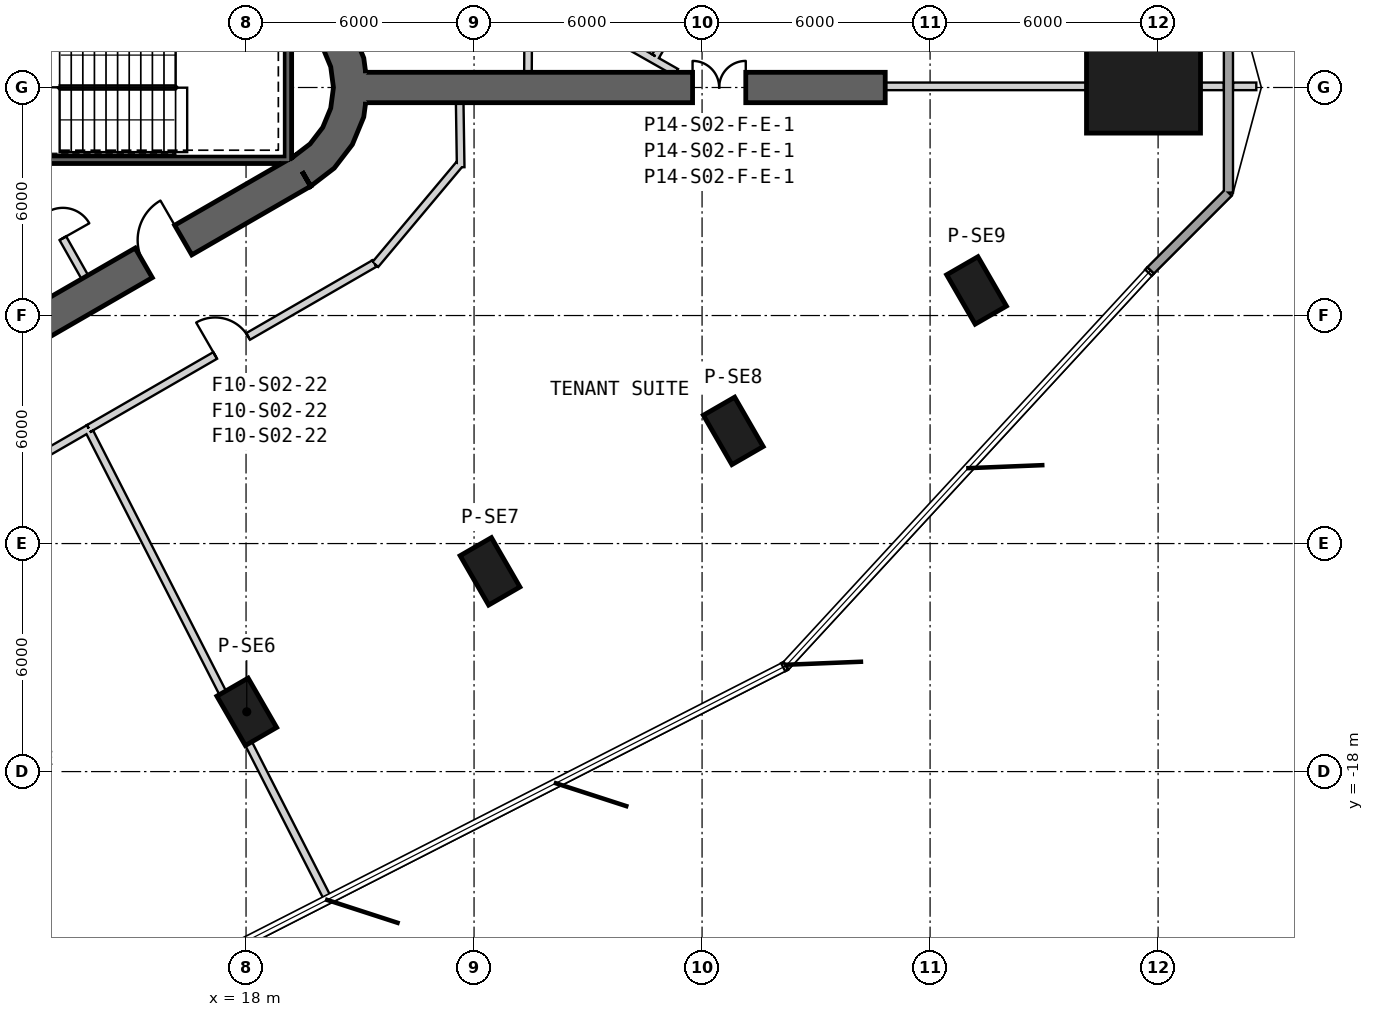
"""IFC4 building model, lengths in metres.
Left out: names, types, materials, properties, quantities, classifications, styles, units other than length and angle.
Written with IfcOpenShell. Run it as: python <this file> out.ifc"""

import sys

from ifc_helpers import new_model, si_unit, direction, frame, frame_2d, origin, origin_2d, place, context, subcontext, project, spatial, polyline, rectangle, outline, extrude, element, fill, save


model = new_model("IFC4")
c1 = context("Model", 3, precision=1e-05, world=origin(), true_north=direction((0.0, 1.0)))
c2 = subcontext(c1, "Body", "Model", "MODEL_VIEW")
j1 = project(units=[si_unit("LENGTHUNIT", "METRE"), si_unit("PLANEANGLEUNIT", "RADIAN")], contexts=[c1])
p1 = place(None, origin())
s1 = spatial("IfcSite", under=j1, at=p1, CompositionType="ELEMENT")
p2 = place(p1, origin())
s2 = spatial("IfcBuilding", under=s1, at=p2, CompositionType="ELEMENT")
p3 = place(p2, frame((0.0, 0.0, 70.1)))
s3 = spatial("IfcBuildingStorey", under=s2, at=p3, CompositionType="ELEMENT", Elevation=70.1)
p4 = place(p3, frame((41.616, 0.0, 0.0), z_axis=(0.0, 0.0, 1.0), x_axis=(1.0, 0.0, 0.0)))
e1 = element("IfcColumn", 1, at=p4, inside=s3, PredefinedType="COLUMN", context=c2, shape_type="SweptSolid", body=[
    extrude(rectangle(XDim=3.0, YDim=2.4, at=origin_2d()), origin(), (0.0, 0.0, 1.0), 4.1),
])
for number, where, z_axis, x_axis in (
    (2, (18.019, -16.427, 0.0), (0.0, 0.0, 1.0), (0.5, -0.866, 0.0)),
    (3, (24.42, -12.731, 0.0), (0.0, 0.0, 1.0), (0.5, -0.866, 0.0)),
    (4, (30.821, -9.035, 0.0), (0.0, 0.0, 1.0), (0.5, -0.866, 0.0)),
    (5, (37.223, -5.34, 0.0), (0.0, 0.0, 1.0), (0.5, -0.866, 0.0)),
):
    element("IfcColumn", number, at=place(p3, frame(where, z_axis=z_axis, x_axis=x_axis)), inside=s3, PredefinedType="COLUMN", context=c2, shape_type="SweptSolid", body=[
        extrude(rectangle(XDim=1.5, YDim=0.95, at=origin_2d()), origin(), (0.0, 0.0, 1.0), 4.1),
    ])
p5 = place(p3, frame((-7.825, -17.97, 0.0), z_axis=(0.0, 0.0, 1.0), x_axis=(0.866028369851, 0.499994862586, 0.0)))
e6 = element("IfcWall", 6, at=p5, inside=s3, PredefinedType="SHEAR", context=c2, shape_type="SweptSolid", body=[
    extrude(rectangle(XDim=31.523, YDim=0.9, at=frame_2d((15.762, 0.0))), origin(), (0.0, 0.0, 1.0), 4.1),
])
p6 = place(p5, frame((7.062, 0.0, 0.0)))
e7 = element("IfcOpeningElement", 7, at=p6, cuts=e6, PredefinedType="OPENING", context=c2, shape_type="SweptSolid", body=[
    extrude(rectangle(XDim=1.2, YDim=2.4, at=frame_2d((0.6, 1.2))), frame((0.0, 0.46, 0.0), z_axis=(0.0, -1.0, 0.0), x_axis=(1.0, 0.0, 0.0)), (0.0, 0.0, 1.0), 0.92),
])
p7 = place(p5, frame((9.762, 0.0, 0.0)))
e8 = element("IfcOpeningElement", 8, at=p7, cuts=e6, PredefinedType="OPENING", context=c2, shape_type="SweptSolid", body=[
    extrude(rectangle(XDim=1.2, YDim=2.4, at=frame_2d((0.6, 1.2))), frame((0.0, 0.46, 0.0), z_axis=(0.0, -1.0, 0.0), x_axis=(1.0, 0.0, 0.0)), (0.0, 0.0, 1.0), 0.92),
])
p8 = place(p5, frame((12.462, 0.0, 0.0)))
e9 = element("IfcOpeningElement", 9, at=p8, cuts=e6, PredefinedType="OPENING", context=c2, shape_type="SweptSolid", body=[
    extrude(rectangle(XDim=1.2, YDim=2.4, at=frame_2d((0.6, 1.2))), frame((0.0, 0.46, 0.0), z_axis=(0.0, -1.0, 0.0), x_axis=(1.0, 0.0, 0.0)), (0.0, 0.0, 1.0), 0.92),
])
p9 = place(p5, frame((15.162, 0.0, 0.0)))
e10 = element("IfcOpeningElement", 10, at=p9, cuts=e6, PredefinedType="OPENING", context=c2, shape_type="SweptSolid", body=[
    extrude(rectangle(XDim=1.2, YDim=2.4, at=frame_2d((0.6, 1.2))), frame((0.0, 0.46, 0.0), z_axis=(0.0, -1.0, 0.0), x_axis=(1.0, 0.0, 0.0)), (0.0, 0.0, 1.0), 0.92),
])
p10 = place(p5, frame((17.862, 0.0, 0.0)))
e11 = element("IfcOpeningElement", 11, at=p10, cuts=e6, PredefinedType="OPENING", context=c2, shape_type="SweptSolid", body=[
    extrude(rectangle(XDim=1.2, YDim=2.4, at=frame_2d((0.6, 1.2))), frame((0.0, 0.46, 0.0), z_axis=(0.0, -1.0, 0.0), x_axis=(1.0, 0.0, 0.0)), (0.0, 0.0, 1.0), 0.92),
])
p11 = place(p5, frame((20.562, 0.0, 0.0)))
e12 = element("IfcOpeningElement", 12, at=p11, cuts=e6, PredefinedType="OPENING", context=c2, shape_type="SweptSolid", body=[
    extrude(rectangle(XDim=1.2, YDim=2.4, at=frame_2d((0.6, 1.2))), frame((0.0, 0.46, 0.0), z_axis=(0.0, -1.0, 0.0), x_axis=(1.0, 0.0, 0.0)), (0.0, 0.0, 1.0), 0.92),
])
p12 = place(p5, frame((26.712, 0.0, 0.0)))
e13 = element("IfcOpeningElement", 13, at=p12, cuts=e6, PredefinedType="OPENING", context=c2, shape_type="SweptSolid", body=[
    extrude(rectangle(XDim=1.2, YDim=2.4, at=frame_2d((0.6, 1.2))), frame((0.0, 0.46, 0.0), z_axis=(0.0, -1.0, 0.0), x_axis=(1.0, 0.0, 0.0)), (0.0, 0.0, 1.0), 0.92),
])
p13 = place(p5, frame((3.612, 0.0, 0.0)))
e14 = element("IfcOpeningElement", 14, at=p13, cuts=e6, PredefinedType="OPENING", context=c2, shape_type="SweptSolid", body=[
    extrude(rectangle(XDim=1.2, YDim=2.4, at=frame_2d((0.6, 1.2))), frame((0.0, 0.46, 0.0), z_axis=(0.0, -1.0, 0.0), x_axis=(1.0, 0.0, 0.0)), (0.0, 0.0, 1.0), 0.92),
])
p14 = place(p3, origin())
e15 = element("IfcWall", 15, at=p14, inside=s3, PredefinedType="SHEAR", context=c2, shape_type="SweptSolid", body=[
    extrude(outline(polyline([(19.7, -2.598), (20.321, -2.121), (20.798, -1.5), (21.098, -0.777), (21.2, 0.0), (21.098, 0.777), (20.798, 1.5), (20.321, 2.121), (19.7, 2.598), (19.25, 1.819), (19.685, 1.485), (20.019, 1.05), (20.229, 0.543), (20.3, 0.0), (20.229, -0.543), (20.019, -1.05), (19.685, -1.485), (19.25, -1.819), (19.7, -2.598)])), origin(), (0.0, 0.0, 1.0), 4.1),
])
p15 = place(p3, frame((21.15, 0.0, 0.0), z_axis=(0.0, 0.0, 1.0), x_axis=(1.0, 0.0, 0.0)))
e16 = element("IfcWall", 16, at=p15, inside=s3, PredefinedType="SHEAR", context=c2, shape_type="SweptSolid", body=[
    extrude(rectangle(XDim=13.67, YDim=0.8, at=frame_2d((6.835, 0.0))), origin(), (0.0, 0.0, 1.0), 4.1),
])
p16 = place(p15, frame((8.6, 0.0, 0.0)))
e17 = element("IfcOpeningElement", 17, at=p16, cuts=e16, PredefinedType="OPENING", context=c2, shape_type="SweptSolid", body=[
    extrude(rectangle(XDim=1.4, YDim=2.4, at=frame_2d((0.7, 1.2))), frame((0.0, 0.41, 0.0), z_axis=(0.0, -1.0, 0.0), x_axis=(1.0, 0.0, 0.0)), (0.0, 0.0, 1.0), 0.82),
])
p17 = place(p3, frame((41.802, -4.814, 0.0), z_axis=(0.0, 0.0, 1.0), x_axis=(0.707148907235, 0.707064652629, 0.0)))
e18 = element("IfcWall", 18, at=p17, inside=s3, PredefinedType="SOLIDWALL", context=c2, shape_type="SweptSolid", body=[
    extrude(rectangle(XDim=2.898, YDim=0.24, at=frame_2d((1.449, 0.0))), origin(), (0.0, 0.0, 1.0), 3.8),
])
p18 = place(p3, frame((43.851, -2.766, 0.0), z_axis=(0.0, 0.0, 1.0), x_axis=(0.0, 1.0, 0.0)))
e19 = element("IfcWall", 19, at=p18, inside=s3, PredefinedType="SOLIDWALL", context=c2, shape_type="SweptSolid", body=[
    extrude(rectangle(XDim=5.531, YDim=0.24, at=frame_2d((2.766, 0.0))), origin(), (0.0, 0.0, 1.0), 3.8),
])
p19 = place(p3, frame((19.1, -2.0, -0.3), z_axis=(0.0, 0.0, 1.0), x_axis=(0.0, 1.0, 0.0)))
e20 = element("IfcWall", 20, at=p19, inside=s3, PredefinedType="SHEAR", context=c2, shape_type="SweptSolid", body=[
    extrude(rectangle(XDim=3.8, YDim=0.2, at=frame_2d((1.9, 0.0))), origin(), (0.0, 0.0, 1.0), 4.1),
])
p20 = place(p3, frame((11.1, -1.9, -0.3), z_axis=(0.0, 0.0, 1.0), x_axis=(1.0, 0.0, 0.0)))
e21 = element("IfcWall", 21, at=p20, inside=s3, PredefinedType="SHEAR", context=c2, shape_type="SweptSolid", body=[
    extrude(rectangle(XDim=7.9, YDim=0.2, at=frame_2d((3.95, 0.0))), origin(), (0.0, 0.0, 1.0), 4.1),
])
p21 = place(p3, frame((13.758, -4.99, 0.0), z_axis=(0.0, 0.0, 1.0), x_axis=(-0.491993409184, 0.87059892334, 0.0)))
e22 = element("IfcWall", 22, at=p21, inside=s3, PredefinedType="PARTITIONING", context=c2, shape_type="SweptSolid", body=[
    extrude(rectangle(XDim=3.15, YDim=0.2, at=frame_2d((1.575, 0.0))), origin(), (0.0, 0.0, 1.0), 3.8),
])
p22 = place(p21, frame((1.175, 0.0, 0.0)))
e23 = element("IfcOpeningElement", 23, at=p22, cuts=e22, PredefinedType="OPENING", context=c2, shape_type="SweptSolid", body=[
    extrude(rectangle(XDim=0.8, YDim=2.1, at=frame_2d((0.4, 1.05))), frame((0.0, 0.11, 0.0), z_axis=(0.0, -1.0, 0.0), x_axis=(1.0, 0.0, 0.0)), (0.0, 0.0, 1.0), 0.22),
])
p23 = place(p3, frame((25.418, 0.4, 0.0), z_axis=(0.0, 0.0, 1.0), x_axis=(0.005737699208, 0.999983539268, 0.0)))
e24 = element("IfcWall", 24, at=p23, inside=s3, PredefinedType="PARTITIONING", context=c2, shape_type="SweptSolid", body=[
    extrude(rectangle(XDim=2.255, YDim=0.2, at=frame_2d((1.127, 0.0))), origin(), (0.0, 0.0, 1.0), 3.8),
])
p24 = place(p3, frame((23.648, -2.098, 0.0), z_axis=(0.0, 0.0, 1.0), x_axis=(-0.015095332307, 0.99988605898, 0.0)))
e25 = element("IfcWall", 25, at=p24, inside=s3, PredefinedType="PARTITIONING", context=c2, shape_type="SweptSolid", body=[
    extrude(rectangle(XDim=1.698, YDim=0.2, at=frame_2d((0.849, 0.0))), origin(), (0.0, 0.0, 1.0), 3.8),
])
p25 = place(p3, frame((21.401, -4.657, 0.0), z_axis=(0.0, 0.0, 1.0), x_axis=(0.642796210095, 0.766037226437, 0.0)))
e26 = element("IfcWall", 26, at=p25, inside=s3, PredefinedType="PARTITIONING", context=c2, shape_type="SweptSolid", body=[
    extrude(rectangle(XDim=3.443, YDim=0.2, at=frame_2d((1.721, 0.0))), origin(), (0.0, 0.0, 1.0), 2.88),
])
p26 = place(p3, frame((2.144, -15.737, 0.0), z_axis=(0.0, 0.0, 1.0), x_axis=(0.866019431537, 0.500010344094, 0.0)))
e27 = element("IfcWall", 27, at=p26, inside=s3, PredefinedType="PARTITIONING", context=c2, shape_type="SweptSolid", body=[
    extrude(rectangle(XDim=13.531, YDim=0.2, at=frame_2d((6.766, 0.0))), origin(), (0.0, 0.0, 1.0), 3.08),
])
p27 = place(p26, frame((6.254, 0.0, 0.0)))
e28 = element("IfcOpeningElement", 28, at=p27, cuts=e27, PredefinedType="OPENING", context=c2, shape_type="SweptSolid", body=[
    extrude(rectangle(XDim=1.0, YDim=2.1, at=frame_2d((0.5, 1.05))), frame((0.0, 0.11, 0.0), z_axis=(0.0, -1.0, 0.0), x_axis=(1.0, 0.0, 0.0)), (0.0, 0.0, 1.0), 0.22),
])
p28 = place(p3, frame((13.862, -8.971, 0.0), z_axis=(0.0, 0.0, 1.0), x_axis=(0.866032891431, 0.499987030792, 0.0)))
e29 = element("IfcWall", 29, at=p28, inside=s3, PredefinedType="PARTITIONING", context=c2, shape_type="SweptSolid", body=[
    extrude(rectangle(XDim=8.68, YDim=0.2, at=frame_2d((4.34, 0.0))), origin(), (0.0, 0.0, 1.0), 2.98),
])
p29 = place(p28, frame((3.84, 0.0, 0.0)))
e30 = element("IfcOpeningElement", 30, at=p29, cuts=e29, PredefinedType="OPENING", context=c2, shape_type="SweptSolid", body=[
    extrude(rectangle(XDim=1.0, YDim=2.1, at=frame_2d((0.5, 1.05))), frame((0.0, 0.11, 0.0), z_axis=(0.0, -1.0, 0.0), x_axis=(1.0, 0.0, 0.0)), (0.0, 0.0, 1.0), 0.22),
])
p30 = place(p3, frame((34.82, 0.03, 0.0), z_axis=(0.0, 0.0, 1.0), x_axis=(1.0, 0.0, 0.0)))
e31 = element("IfcWall", 31, at=p30, inside=s3, PredefinedType="PARTITIONING", context=c2, shape_type="SweptSolid", body=[
    extrude(rectangle(XDim=5.296, YDim=0.2, at=frame_2d((2.648, 0.0))), origin(), (0.0, 0.0, 1.0), 3.37),
])
p31 = place(p3, frame((43.116, 0.03, 0.0), z_axis=(0.0, 0.0, 1.0), x_axis=(1.0, 0.0, 0.0)))
e32 = element("IfcWall", 32, at=p31, inside=s3, PredefinedType="PARTITIONING", context=c2, shape_type="SweptSolid", body=[
    extrude(rectangle(XDim=0.615, YDim=0.2, at=frame_2d((0.307, 0.0))), origin(), (0.0, 0.0, 1.0), 3.8),
])
p32 = place(p3, frame((43.971, 0.03, 0.0), z_axis=(0.0, 0.0, 1.0), x_axis=(1.0, 0.0, 0.0)))
e33 = element("IfcWall", 33, at=p32, inside=s3, PredefinedType="PARTITIONING", context=c2, shape_type="SweptSolid", body=[
    extrude(rectangle(XDim=0.613, YDim=0.2, at=frame_2d((0.307, 0.0))), origin(), (0.0, 0.0, 1.0), 3.8),
])
p33 = place(p3, frame((25.446, 2.594, 0.0), z_axis=(0.0, 0.0, 1.0), x_axis=(0.869969631216, -0.493105303928, 0.0)))
e34 = element("IfcWall", 34, at=p33, inside=s3, PredefinedType="PARTITIONING", context=c2, shape_type="SweptSolid", body=[
    extrude(rectangle(XDim=4.45, YDim=0.2, at=frame_2d((2.225, 0.0))), origin(), (0.0, 0.0, 1.0), 3.8),
])
p34 = place(p3, frame((28.776, 0.822, 0.0), z_axis=(0.0, 0.0, 1.0), x_axis=(0.499995686755, 0.866027894023, 0.0)))
e35 = element("IfcWall", 35, at=p34, inside=s3, PredefinedType="PARTITIONING", context=c2, shape_type="SweptSolid", body=[
    extrude(rectangle(XDim=5.44, YDim=0.2, at=frame_2d((2.72, 0.0))), origin(), (0.0, 0.0, 1.0), 2.88),
])
p35 = place(p34, frame((2.17, 0.0, 0.0)))
e36 = element("IfcOpeningElement", 36, at=p35, cuts=e35, PredefinedType="OPENING", context=c2, shape_type="SweptSolid", body=[
    extrude(rectangle(XDim=1.0, YDim=2.1, at=frame_2d((0.5, 1.05))), frame((0.0, 0.11, 0.0), z_axis=(0.0, -1.0, 0.0), x_axis=(1.0, 0.0, 0.0)), (0.0, 0.0, 1.0), 0.22),
])
p36 = place(p3, frame((13.888, -9.071, 0.0), z_axis=(0.0, 0.0, 1.0), x_axis=(0.454417909926, -0.890788618663, 0.0)))
e37 = element("IfcWall", 37, at=p36, inside=s3, PredefinedType="PARTITIONING", context=c2, shape_type="SweptSolid", body=[
    extrude(rectangle(XDim=13.798, YDim=0.2, at=frame_2d((6.899, 0.0))), origin(), (0.0, 0.0, 1.0), 3.08),
])
p37 = place(p22, origin())
e38 = element("IfcDoor", 38, at=p37, inside=s3, OperationType="SINGLE_SWING_RIGHT", PredefinedType="USERDEFINED", context=c2, shape_type="SweptSolid", body=[
    extrude(rectangle(XDim=0.8, YDim=2.1, at=frame_2d((0.4, 1.05))), frame((0.0, 0.025, 0.0), z_axis=(0.0, -1.0, 0.0), x_axis=(1.0, 0.0, 0.0)), (0.0, 0.0, 1.0), 0.05),
])
fill(e23, e38)
p38 = place(p29, origin())
e39 = element("IfcDoor", 39, at=p38, inside=s3, OperationType="SINGLE_SWING_RIGHT", PredefinedType="USERDEFINED", context=c2, shape_type="SweptSolid", body=[
    extrude(rectangle(XDim=1.0, YDim=2.1, at=frame_2d((0.5, 1.05))), frame((0.0, 0.025, 0.0), z_axis=(0.0, -1.0, 0.0), x_axis=(1.0, 0.0, 0.0)), (0.0, 0.0, 1.0), 0.05),
])
fill(e30, e39)
p39 = place(p12, origin())
e40 = element("IfcDoor", 40, at=p39, inside=s3, OperationType="SINGLE_SWING_RIGHT", PredefinedType="USERDEFINED", context=c2, shape_type="SweptSolid", body=[
    extrude(rectangle(XDim=1.2, YDim=2.4, at=frame_2d((0.6, 1.2))), frame((0.0, 0.025, 0.0), z_axis=(0.0, -1.0, 0.0), x_axis=(1.0, 0.0, 0.0)), (0.0, 0.0, 1.0), 0.05),
])
fill(e13, e40)
p40 = place(p16, origin())
e41 = element("IfcDoor", 41, at=p40, inside=s3, OperationType="DOUBLE_DOOR_SINGLE_SWING", PredefinedType="NOTDEFINED", context=c2, shape_type="SweptSolid", body=[
    extrude(rectangle(XDim=1.4, YDim=2.4, at=frame_2d((0.7, 1.2))), frame((0.0, 0.025, 0.0), z_axis=(0.0, -1.0, 0.0), x_axis=(1.0, 0.0, 0.0)), (0.0, 0.0, 1.0), 0.05),
])
fill(e17, e41)
save(model, sys.argv[1])
